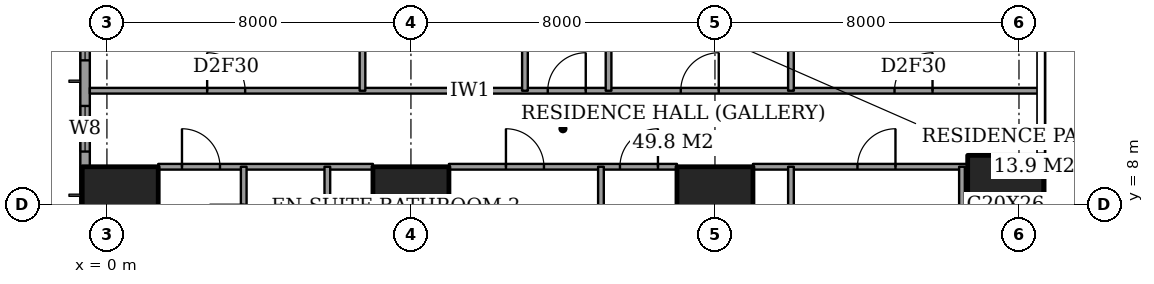
"""IFC4 building model, lengths in metres.
Left out: names, types, materials, properties, quantities, classifications, styles, units other than length and angle.
Written with IfcOpenShell. Run it as: python <this file> out.ifc"""

import sys

from ifc_helpers import new_model, si_unit, direction, frame, frame_2d, origin, origin_2d, place, context, subcontext, project, spatial, rectangle, extrude, element, fill, save


model = new_model("IFC4")
c1 = context("Model", 3, precision=1e-05, world=origin(), true_north=direction((0.0, 1.0)))
c2 = subcontext(c1, "Body", "Model", "MODEL_VIEW")
j1 = project(units=[si_unit("LENGTHUNIT", "METRE"), si_unit("PLANEANGLEUNIT", "RADIAN")], contexts=[c1])
p1 = place(None, origin())
s1 = spatial("IfcSite", under=j1, at=p1, CompositionType="ELEMENT")
p2 = place(p1, origin())
s2 = spatial("IfcBuilding", under=s1, at=p2, CompositionType="ELEMENT")
p3 = place(p2, frame((0.0, 0.0, 69.2)))
s3 = spatial("IfcBuildingStorey", under=s2, at=p3, CompositionType="ELEMENT", Elevation=69.2)
for number, where, z_axis, x_axis in (
    (1, (0.35, 8.0, 0.0), (0.0, 0.0, 1.0), (1.0, 0.0, 0.0)),
    (2, (8.0, 8.0, 0.0), (0.0, 0.0, 1.0), (1.0, 0.0, 0.0)),
    (3, (16.0, 8.0, 0.0), (0.0, 0.0, 1.0), (1.0, 0.0, 0.0)),
):
    element("IfcColumn", number, at=place(p3, frame(where, z_axis=z_axis, x_axis=x_axis)), inside=s3, PredefinedType="COLUMN", context=c2, shape_type="SweptSolid", body=[
        extrude(rectangle(XDim=2.0, YDim=2.0, at=origin_2d()), origin(), (0.0, 0.0, 1.0), 3.6),
    ])
p4 = place(p3, frame((23.65, 8.0, 0.0), z_axis=(0.0, 0.0, 1.0), x_axis=(1.0, 0.0, 0.0)))
e4 = element("IfcColumn", 4, at=p4, inside=s3, PredefinedType="COLUMN", context=c2, shape_type="SweptSolid", body=[
    extrude(rectangle(XDim=2.0, YDim=2.6, at=origin_2d()), origin(), (0.0, 0.0, 1.0), 3.6),
])
p5 = place(p3, frame((-0.575, 44.825, 0.0), z_axis=(0.0, 0.0, 1.0), x_axis=(0.0, -1.0, 0.0)))
e5 = element("IfcWall", 5, at=p5, inside=s3, PredefinedType="SOLIDWALL", context=c2, shape_type="SweptSolid", body=[
    extrude(rectangle(XDim=41.65, YDim=0.25, at=frame_2d((20.825, 0.0))), origin(), (0.0, 0.0, 1.0), 3.6),
])
p6 = place(p5, frame((0.775, 0.0, 0.6)))
e6 = element("IfcOpeningElement", 6, at=p6, cuts=e5, PredefinedType="OPENING", context=c2, shape_type="SweptSolid", body=[
    extrude(rectangle(XDim=2.4, YDim=2.0, at=frame_2d((1.2, 1.0))), frame((0.0, 0.135, 0.0), z_axis=(0.0, -1.0, 0.0), x_axis=(1.0, 0.0, 0.0)), (0.0, 0.0, 1.0), 0.27),
])
p7 = place(p5, frame((6.1, 0.0, 0.6)))
e7 = element("IfcOpeningElement", 7, at=p7, cuts=e5, PredefinedType="OPENING", context=c2, shape_type="SweptSolid", body=[
    extrude(rectangle(XDim=1.2, YDim=2.0, at=frame_2d((0.6, 1.0))), frame((0.0, 0.135, 0.0), z_axis=(0.0, -1.0, 0.0), x_axis=(1.0, 0.0, 0.0)), (0.0, 0.0, 1.0), 0.27),
])
p8 = place(p5, frame((8.425, 0.0, 0.6)))
e8 = element("IfcOpeningElement", 8, at=p8, cuts=e5, PredefinedType="OPENING", context=c2, shape_type="SweptSolid", body=[
    extrude(rectangle(XDim=2.4, YDim=2.0, at=frame_2d((1.2, 1.0))), frame((0.0, 0.135, 0.0), z_axis=(0.0, -1.0, 0.0), x_axis=(1.0, 0.0, 0.0)), (0.0, 0.0, 1.0), 0.27),
])
p9 = place(p5, frame((15.625, 0.0, 0.6)))
e9 = element("IfcOpeningElement", 9, at=p9, cuts=e5, PredefinedType="OPENING", context=c2, shape_type="SweptSolid", body=[
    extrude(rectangle(XDim=2.4, YDim=2.0, at=frame_2d((1.2, 1.0))), frame((0.0, 0.135, 0.0), z_axis=(0.0, -1.0, 0.0), x_axis=(1.0, 0.0, 0.0)), (0.0, 0.0, 1.0), 0.27),
])
p10 = place(p5, frame((23.625, 0.0, 0.6)))
e10 = element("IfcOpeningElement", 10, at=p10, cuts=e5, PredefinedType="OPENING", context=c2, shape_type="SweptSolid", body=[
    extrude(rectangle(XDim=2.4, YDim=2.0, at=frame_2d((1.2, 1.0))), frame((0.0, 0.135, 0.0), z_axis=(0.0, -1.0, 0.0), x_axis=(1.0, 0.0, 0.0)), (0.0, 0.0, 1.0), 0.27),
])
p11 = place(p5, frame((30.625, 0.0, 0.6)))
e11 = element("IfcOpeningElement", 11, at=p11, cuts=e5, PredefinedType="OPENING", context=c2, shape_type="SweptSolid", body=[
    extrude(rectangle(XDim=2.4, YDim=2.0, at=frame_2d((1.2, 1.0))), frame((0.0, 0.135, 0.0), z_axis=(0.0, -1.0, 0.0), x_axis=(1.0, 0.0, 0.0)), (0.0, 0.0, 1.0), 0.27),
])
p12 = place(p5, frame((34.225, 0.0, 0.6)))
e12 = element("IfcOpeningElement", 12, at=p12, cuts=e5, PredefinedType="OPENING", context=c2, shape_type="SweptSolid", body=[
    extrude(rectangle(XDim=1.2, YDim=2.0, at=frame_2d((0.6, 1.0))), frame((0.0, 0.135, 0.0), z_axis=(0.0, -1.0, 0.0), x_axis=(1.0, 0.0, 0.0)), (0.0, 0.0, 1.0), 0.27),
])
p13 = place(p5, frame((38.475, 0.0, 0.6)))
e13 = element("IfcOpeningElement", 13, at=p13, cuts=e5, PredefinedType="OPENING", context=c2, shape_type="SweptSolid", body=[
    extrude(rectangle(XDim=2.4, YDim=2.0, at=frame_2d((1.2, 1.0))), frame((0.0, 0.135, 0.0), z_axis=(0.0, -1.0, 0.0), x_axis=(1.0, 0.0, 0.0)), (0.0, 0.0, 1.0), 0.27),
])
p14 = place(p3, frame((1.35, 9.0, 0.0), z_axis=(0.0, 0.0, 1.0), x_axis=(1.0, 0.0, 0.0)))
e14 = element("IfcWall", 14, at=p14, inside=s3, PredefinedType="PARTITIONING", context=c2, shape_type="SweptSolid", body=[
    extrude(rectangle(XDim=5.65, YDim=0.15, at=frame_2d((2.825, 0.0))), origin(), (0.0, 0.0, 1.0), 3.35),
])
p15 = place(p14, frame((0.625, 0.0, 0.0)))
e15 = element("IfcOpeningElement", 15, at=p15, cuts=e14, PredefinedType="OPENING", context=c2, shape_type="SweptSolid", body=[
    extrude(rectangle(XDim=1.0, YDim=2.1, at=frame_2d((0.5, 1.05))), frame((0.0, 0.085, 0.0), z_axis=(0.0, -1.0, 0.0), x_axis=(1.0, 0.0, 0.0)), (0.0, 0.0, 1.0), 0.17),
])
p16 = place(p3, frame((9.0, 9.0, 0.0), z_axis=(0.0, 0.0, 1.0), x_axis=(1.0, 0.0, 0.0)))
e16 = element("IfcWall", 16, at=p16, inside=s3, PredefinedType="PARTITIONING", context=c2, shape_type="SweptSolid", body=[
    extrude(rectangle(XDim=6.0, YDim=0.15, at=frame_2d((3.0, 0.0))), origin(), (0.0, 0.0, 1.0), 3.35),
])
p17 = place(p16, frame((1.5, 0.0, 0.0)))
e17 = element("IfcOpeningElement", 17, at=p17, cuts=e16, PredefinedType="OPENING", context=c2, shape_type="SweptSolid", body=[
    extrude(rectangle(XDim=1.0, YDim=2.1, at=frame_2d((0.5, 1.05))), frame((0.0, 0.085, 0.0), z_axis=(0.0, -1.0, 0.0), x_axis=(1.0, 0.0, 0.0)), (0.0, 0.0, 1.0), 0.17),
])
p18 = place(p16, frame((4.5, 0.0, 0.0)))
e18 = element("IfcOpeningElement", 18, at=p18, cuts=e16, PredefinedType="OPENING", context=c2, shape_type="SweptSolid", body=[
    extrude(rectangle(XDim=1.0, YDim=2.1, at=frame_2d((0.5, 1.05))), frame((0.0, 0.085, 0.0), z_axis=(0.0, -1.0, 0.0), x_axis=(1.0, 0.0, 0.0)), (0.0, 0.0, 1.0), 0.17),
])
p19 = place(p3, frame((17.0, 9.0, 0.0), z_axis=(0.0, 0.0, 1.0), x_axis=(1.0, 0.0, 0.0)))
e19 = element("IfcWall", 19, at=p19, inside=s3, PredefinedType="PARTITIONING", context=c2, shape_type="SweptSolid", body=[
    extrude(rectangle(XDim=5.65, YDim=0.15, at=frame_2d((2.825, 0.0))), origin(), (0.0, 0.0, 1.0), 3.35),
])
p20 = place(p19, frame((2.75, 0.0, 0.0)))
e20 = element("IfcOpeningElement", 20, at=p20, cuts=e19, PredefinedType="OPENING", context=c2, shape_type="SweptSolid", body=[
    extrude(rectangle(XDim=1.0, YDim=2.1, at=frame_2d((0.5, 1.05))), frame((0.0, 0.085, 0.0), z_axis=(0.0, -1.0, 0.0), x_axis=(1.0, 0.0, 0.0)), (0.0, 0.0, 1.0), 0.17),
])
p21 = place(p3, frame((-0.45, 11.0, 0.0), z_axis=(0.0, 0.0, 1.0), x_axis=(1.0, 0.0, 0.0)))
e21 = element("IfcWall", 21, at=p21, inside=s3, PredefinedType="PARTITIONING", context=c2, shape_type="SweptSolid", body=[
    extrude(rectangle(XDim=25.011, YDim=0.15, at=frame_2d((12.505, 0.0))), origin(), (0.0, 0.0, 1.0), 3.35),
])
p22 = place(p21, frame((12.05, 0.0, 0.0)))
e22 = element("IfcOpeningElement", 22, at=p22, cuts=e21, PredefinedType="OPENING", context=c2, shape_type="SweptSolid", body=[
    extrude(rectangle(XDim=1.0, YDim=2.1, at=frame_2d((0.5, 1.05))), frame((0.0, 0.085, 0.0), z_axis=(0.0, -1.0, 0.0), x_axis=(1.0, 0.0, 0.0)), (0.0, 0.0, 1.0), 0.17),
])
p23 = place(p21, frame((3.087, 0.0, 0.0)))
e23 = element("IfcOpeningElement", 23, at=p23, cuts=e21, PredefinedType="OPENING", context=c2, shape_type="SweptSolid", body=[
    extrude(rectangle(XDim=1.0, YDim=2.1, at=frame_2d((0.5, 1.05))), frame((0.0, 0.085, 0.0), z_axis=(0.0, -1.0, 0.0), x_axis=(1.0, 0.0, 0.0)), (0.0, 0.0, 1.0), 0.17),
])
p24 = place(p21, frame((15.55, 0.0, 0.0)))
e24 = element("IfcOpeningElement", 24, at=p24, cuts=e21, PredefinedType="OPENING", context=c2, shape_type="SweptSolid", body=[
    extrude(rectangle(XDim=1.0, YDim=2.1, at=frame_2d((0.5, 1.05))), frame((0.0, 0.085, 0.0), z_axis=(0.0, -1.0, 0.0), x_axis=(1.0, 0.0, 0.0)), (0.0, 0.0, 1.0), 0.17),
])
p25 = place(p21, frame((21.175, 0.0, 0.0)))
e25 = element("IfcOpeningElement", 25, at=p25, cuts=e21, PredefinedType="OPENING", context=c2, shape_type="SweptSolid", body=[
    extrude(rectangle(XDim=1.0, YDim=2.1, at=frame_2d((0.5, 1.05))), frame((0.0, 0.085, 0.0), z_axis=(0.0, -1.0, 0.0), x_axis=(1.0, 0.0, 0.0)), (0.0, 0.0, 1.0), 0.17),
])
p26 = place(p3, frame((3.6, 6.1, 0.0), z_axis=(0.0, 0.0, 1.0), x_axis=(0.0, 1.0, 0.0)))
e26 = element("IfcWall", 26, at=p26, inside=s3, PredefinedType="PARTITIONING", context=c2, shape_type="SweptSolid", body=[
    extrude(rectangle(XDim=2.9, YDim=0.15, at=frame_2d((1.45, 0.0))), origin(), (0.0, 0.0, 1.0), 3.35),
])
p27 = place(p26, frame((1.0, 0.0, 0.0)))
e27 = element("IfcOpeningElement", 27, at=p27, cuts=e26, PredefinedType="OPENING", context=c2, shape_type="SweptSolid", body=[
    extrude(rectangle(XDim=0.9, YDim=2.1, at=frame_2d((0.45, 1.05))), frame((0.0, 0.085, 0.0), z_axis=(0.0, -1.0, 0.0), x_axis=(1.0, 0.0, 0.0)), (0.0, 0.0, 1.0), 0.17),
])
p28 = place(p3, frame((5.8, -0.45, 0.0), z_axis=(0.0, 0.0, 1.0), x_axis=(0.0, 1.0, 0.0)))
e28 = element("IfcWall", 28, at=p28, inside=s3, PredefinedType="PARTITIONING", context=c2, shape_type="SweptSolid", body=[
    extrude(rectangle(XDim=9.45, YDim=0.15, at=frame_2d((4.725, 0.0))), origin(), (0.0, 0.0, 1.0), 3.35),
])
p29 = place(p3, frame((6.725, 11.0, 0.0), z_axis=(0.0, 0.0, 1.0), x_axis=(0.0, 1.0, 0.0)))
e29 = element("IfcWall", 29, at=p29, inside=s3, PredefinedType="PARTITIONING", context=c2, shape_type="SweptSolid", body=[
    extrude(rectangle(XDim=3.8, YDim=0.15, at=frame_2d((1.9, 0.0))), origin(), (0.0, 0.0, 1.0), 3.35),
])
p30 = place(p29, frame((1.15, 0.0, 0.0)))
e30 = element("IfcOpeningElement", 30, at=p30, cuts=e29, PredefinedType="OPENING", context=c2, shape_type="SweptSolid", body=[
    extrude(rectangle(XDim=0.9, YDim=2.1, at=frame_2d((0.45, 1.05))), frame((0.0, 0.085, 0.0), z_axis=(0.0, -1.0, 0.0), x_axis=(1.0, 0.0, 0.0)), (0.0, 0.0, 1.0), 0.17),
])
p31 = place(p3, frame((11.0, 11.0, 0.0), z_axis=(0.0, 0.0, 1.0), x_axis=(0.0, 1.0, 0.0)))
e31 = element("IfcWall", 31, at=p31, inside=s3, PredefinedType="PARTITIONING", context=c2, shape_type="SweptSolid", body=[
    extrude(rectangle(XDim=10.6, YDim=0.15, at=frame_2d((5.3, 0.0))), origin(), (0.0, 0.0, 1.0), 3.35),
])
p32 = place(p31, frame((7.962, 0.0, 0.0)))
e32 = element("IfcOpeningElement", 32, at=p32, cuts=e31, PredefinedType="OPENING", context=c2, shape_type="SweptSolid", body=[
    extrude(rectangle(XDim=1.0, YDim=2.1, at=frame_2d((0.5, 1.05))), frame((0.0, 0.085, 0.0), z_axis=(0.0, -1.0, 0.0), x_axis=(1.0, 0.0, 0.0)), (0.0, 0.0, 1.0), 0.17),
])
p33 = place(p3, frame((13.0, -0.45, 0.0), z_axis=(0.0, 0.0, 1.0), x_axis=(0.0, 1.0, 0.0)))
e33 = element("IfcWall", 33, at=p33, inside=s3, PredefinedType="PARTITIONING", context=c2, shape_type="SweptSolid", body=[
    extrude(rectangle(XDim=9.45, YDim=0.15, at=frame_2d((4.725, 0.0))), origin(), (0.0, 0.0, 1.0), 3.35),
])
p34 = place(p3, frame((13.2, 11.0, 0.0), z_axis=(0.0, 0.0, 1.0), x_axis=(0.0, 1.0, 0.0)))
e34 = element("IfcWall", 34, at=p34, inside=s3, PredefinedType="PARTITIONING", context=c2, shape_type="SweptSolid", body=[
    extrude(rectangle(XDim=6.325, YDim=0.15, at=frame_2d((3.163, 0.0))), origin(), (0.0, 0.0, 1.0), 3.35),
])
p35 = place(p3, frame((18.0, -0.45, 0.0), z_axis=(0.0, 0.0, 1.0), x_axis=(0.0, 1.0, 0.0)))
e35 = element("IfcWall", 35, at=p35, inside=s3, PredefinedType="PARTITIONING", context=c2, shape_type="SweptSolid", body=[
    extrude(rectangle(XDim=9.45, YDim=0.15, at=frame_2d((4.725, 0.0))), origin(), (0.0, 0.0, 1.0), 3.35),
])
p36 = place(p3, frame((18.0, 11.0, 0.0), z_axis=(0.0, 0.0, 1.0), x_axis=(0.0, 1.0, 0.0)))
e36 = element("IfcWall", 36, at=p36, inside=s3, PredefinedType="PARTITIONING", context=c2, shape_type="SweptSolid", body=[
    extrude(rectangle(XDim=6.325, YDim=0.15, at=frame_2d((3.163, 0.0))), origin(), (0.0, 0.0, 1.0), 3.35),
])
p37 = place(p3, frame((22.5, -0.45, 0.0), z_axis=(0.0, 0.0, 1.0), x_axis=(0.0, 1.0, 0.0)))
e37 = element("IfcWall", 37, at=p37, inside=s3, PredefinedType="PARTITIONING", context=c2, shape_type="SweptSolid", body=[
    extrude(rectangle(XDim=9.45, YDim=0.15, at=frame_2d((4.725, 0.0))), origin(), (0.0, 0.0, 1.0), 3.35),
])
p38 = place(p37, frame((4.275, 0.0, 0.0)))
e38 = element("IfcOpeningElement", 38, at=p38, cuts=e37, PredefinedType="OPENING", context=c2, shape_type="SweptSolid", body=[
    extrude(rectangle(XDim=0.9, YDim=2.1, at=frame_2d((0.45, 1.05))), frame((0.0, 0.085, 0.0), z_axis=(0.0, -1.0, 0.0), x_axis=(1.0, 0.0, 0.0)), (0.0, 0.0, 1.0), 0.17),
])
p39 = place(p11, origin())
e39 = element("IfcWindow", 39, at=p39, inside=s3, PartitioningType="SINGLE_PANEL", PredefinedType="WINDOW", context=c2, shape_type="SweptSolid", body=[
    extrude(rectangle(XDim=2.4, YDim=2.0, at=frame_2d((1.2, 1.0))), frame((0.0, 0.03, 0.0), z_axis=(0.0, -1.0, 0.0), x_axis=(1.0, 0.0, 0.0)), (0.0, 0.0, 1.0), 0.06),
])
fill(e11, e39)
p40 = place(p12, origin())
e40 = element("IfcWindow", 40, at=p40, inside=s3, PartitioningType="SINGLE_PANEL", PredefinedType="WINDOW", context=c2, shape_type="SweptSolid", body=[
    extrude(rectangle(XDim=1.2, YDim=2.0, at=frame_2d((0.6, 1.0))), frame((0.0, 0.03, 0.0), z_axis=(0.0, -1.0, 0.0), x_axis=(1.0, 0.0, 0.0)), (0.0, 0.0, 1.0), 0.06),
])
fill(e12, e40)
p41 = place(p15, origin())
e41 = element("IfcDoor", 41, at=p41, inside=s3, OperationType="SINGLE_SWING_RIGHT", PredefinedType="DOOR", context=c2, shape_type="SweptSolid", body=[
    extrude(rectangle(XDim=1.0, YDim=2.1, at=frame_2d((0.5, 1.05))), frame((0.0, 0.025, 0.0), z_axis=(0.0, -1.0, 0.0), x_axis=(1.0, 0.0, 0.0)), (0.0, 0.0, 1.0), 0.05),
])
fill(e15, e41)
p42 = place(p17, origin())
e42 = element("IfcDoor", 42, at=p42, inside=s3, OperationType="SINGLE_SWING_RIGHT", PredefinedType="DOOR", context=c2, shape_type="SweptSolid", body=[
    extrude(rectangle(XDim=1.0, YDim=2.1, at=frame_2d((0.5, 1.05))), frame((0.0, 0.025, 0.0), z_axis=(0.0, -1.0, 0.0), x_axis=(1.0, 0.0, 0.0)), (0.0, 0.0, 1.0), 0.05),
])
fill(e17, e42)
p43 = place(p18, origin())
e43 = element("IfcDoor", 43, at=p43, inside=s3, OperationType="SINGLE_SWING_LEFT", PredefinedType="DOOR", context=c2, shape_type="SweptSolid", body=[
    extrude(rectangle(XDim=1.0, YDim=2.1, at=frame_2d((0.5, 1.05))), frame((0.0, 0.025, 0.0), z_axis=(0.0, -1.0, 0.0), x_axis=(1.0, 0.0, 0.0)), (0.0, 0.0, 1.0), 0.05),
])
fill(e18, e43)
p44 = place(p20, origin())
e44 = element("IfcDoor", 44, at=p44, inside=s3, OperationType="SINGLE_SWING_LEFT", PredefinedType="DOOR", context=c2, shape_type="SweptSolid", body=[
    extrude(rectangle(XDim=1.0, YDim=2.1, at=frame_2d((0.5, 1.05))), frame((0.0, 0.025, 0.0), z_axis=(0.0, -1.0, 0.0), x_axis=(1.0, 0.0, 0.0)), (0.0, 0.0, 1.0), 0.05),
])
fill(e20, e44)
p45 = place(p22, origin())
e45 = element("IfcDoor", 45, at=p45, inside=s3, OperationType="SINGLE_SWING_LEFT", PredefinedType="DOOR", context=c2, shape_type="SweptSolid", body=[
    extrude(rectangle(XDim=1.0, YDim=2.1, at=frame_2d((0.5, 1.05))), frame((0.0, 0.025, 0.0), z_axis=(0.0, -1.0, 0.0), x_axis=(1.0, 0.0, 0.0)), (0.0, 0.0, 1.0), 0.05),
])
fill(e22, e45)
p46 = place(p23, origin())
e46 = element("IfcDoor", 46, at=p46, inside=s3, OperationType="SINGLE_SWING_RIGHT", PredefinedType="DOOR", context=c2, shape_type="SweptSolid", body=[
    extrude(rectangle(XDim=1.0, YDim=2.1, at=frame_2d((0.5, 1.05))), frame((0.0, 0.025, 0.0), z_axis=(0.0, -1.0, 0.0), x_axis=(1.0, 0.0, 0.0)), (0.0, 0.0, 1.0), 0.05),
])
fill(e23, e46)
p47 = place(p24, origin())
e47 = element("IfcDoor", 47, at=p47, inside=s3, OperationType="SINGLE_SWING_LEFT", PredefinedType="DOOR", context=c2, shape_type="SweptSolid", body=[
    extrude(rectangle(XDim=1.0, YDim=2.1, at=frame_2d((0.5, 1.05))), frame((0.0, 0.025, 0.0), z_axis=(0.0, -1.0, 0.0), x_axis=(1.0, 0.0, 0.0)), (0.0, 0.0, 1.0), 0.05),
])
fill(e24, e47)
p48 = place(p25, origin())
e48 = element("IfcDoor", 48, at=p48, inside=s3, OperationType="SINGLE_SWING_LEFT", PredefinedType="DOOR", context=c2, shape_type="SweptSolid", body=[
    extrude(rectangle(XDim=1.0, YDim=2.1, at=frame_2d((0.5, 1.05))), frame((0.0, 0.025, 0.0), z_axis=(0.0, -1.0, 0.0), x_axis=(1.0, 0.0, 0.0)), (0.0, 0.0, 1.0), 0.05),
])
fill(e25, e48)
save(model, sys.argv[1])
